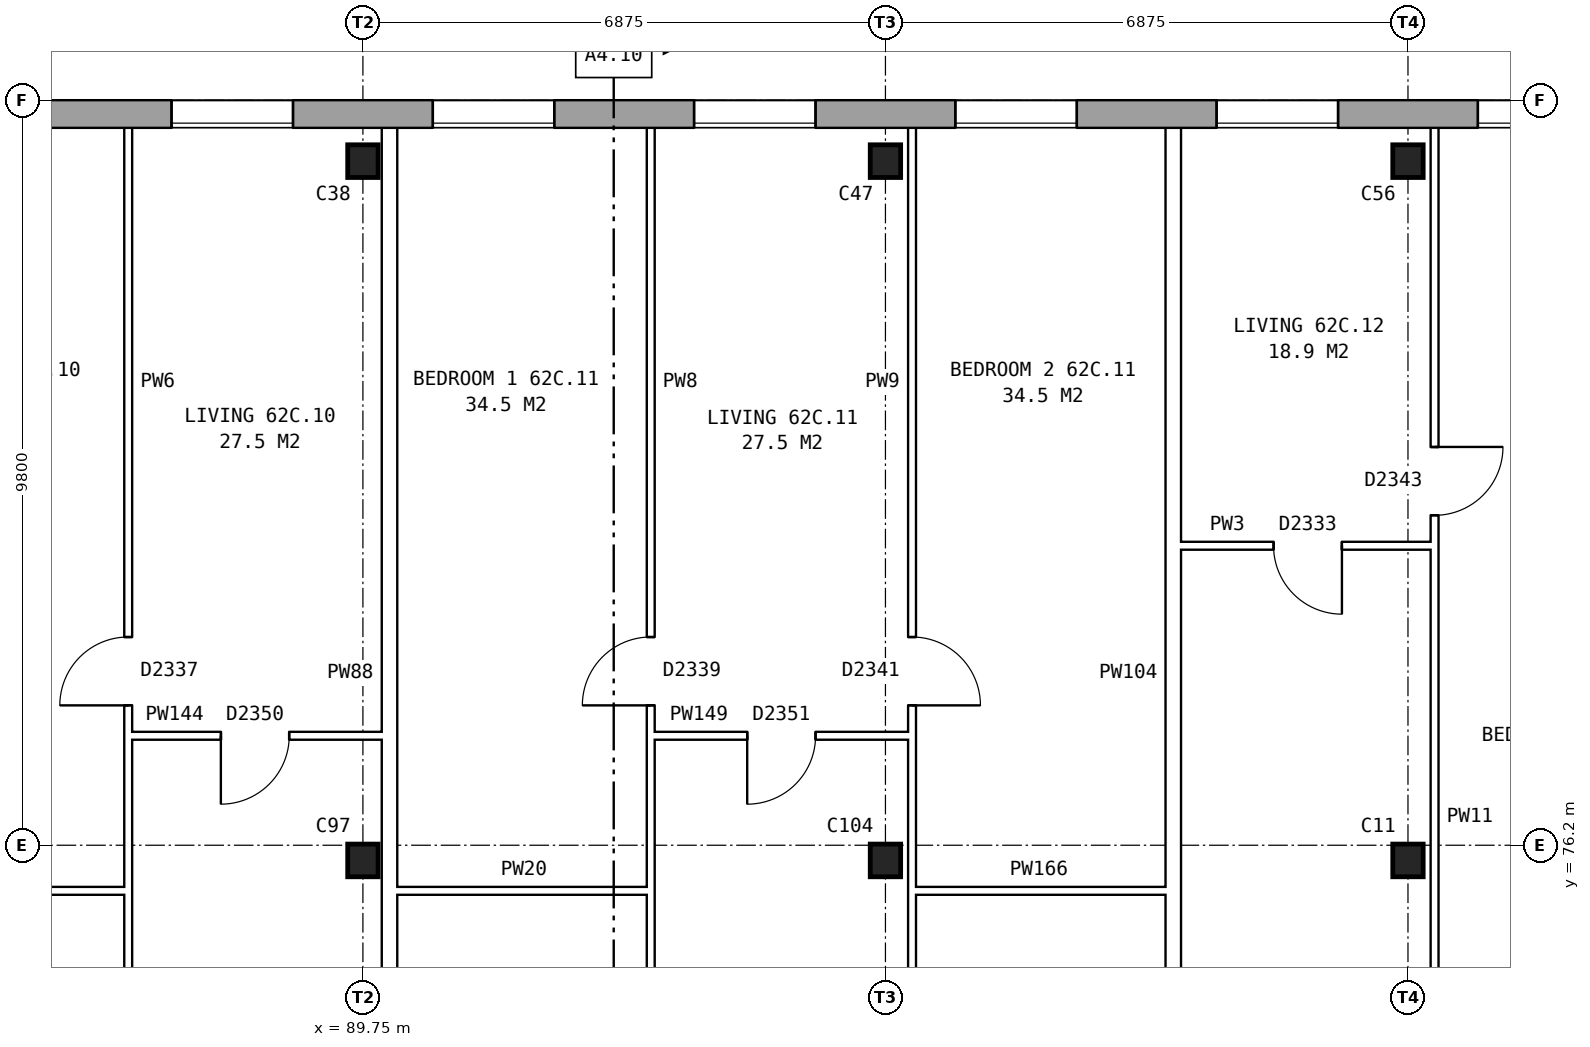
"""IFC4 building model, lengths in metres.
Left out: names, types, materials, properties, quantities, classifications, styles, units other than length and angle.
Written with IfcOpenShell. Run it as: python <this file> out.ifc"""

import sys

from ifc_helpers import new_model, si_unit, direction, frame, frame_2d, origin, origin_2d, place, context, subcontext, project, spatial, rectangle, i_section, extrude, element, fill, save


model = new_model("IFC4")
c1 = context("Model", 3, precision=1e-05, world=origin(), true_north=direction((0.0, 1.0)))
c2 = subcontext(c1, "Body", "Model", "MODEL_VIEW")
j1 = project(units=[si_unit("LENGTHUNIT", "METRE"), si_unit("PLANEANGLEUNIT", "RADIAN")], contexts=[c1])
p1 = place(None, origin())
s1 = spatial("IfcSite", under=j1, at=p1, CompositionType="ELEMENT")
p2 = place(p1, origin())
s2 = spatial("IfcBuilding", under=s1, at=p2, CompositionType="ELEMENT")
p3 = place(p2, frame((0.0, 0.0, 221.4)))
s3 = spatial("IfcBuildingStorey", under=s2, at=p3, CompositionType="ELEMENT", Elevation=221.4)
for number, where, z_axis, x_axis in (
    (1, (89.75, 76.0, 0.0), (0.0, 0.0, 1.0), (1.0, 0.0, 0.0)),
    (2, (96.625, 76.0, 0.0), (0.0, 0.0, 1.0), (1.0, 0.0, 0.0)),
    (3, (103.5, 76.0, 0.0), (0.0, 0.0, 1.0), (1.0, 0.0, 0.0)),
    (4, (89.75, 85.2, 0.0), (0.0, 0.0, 1.0), (1.0, 0.0, 0.0)),
    (5, (96.625, 85.2, 0.0), (0.0, 0.0, 1.0), (1.0, 0.0, 0.0)),
    (6, (103.5, 85.2, 0.0), (0.0, 0.0, 1.0), (1.0, 0.0, 0.0)),
):
    element("IfcColumn", number, at=place(p3, frame(where, z_axis=z_axis, x_axis=x_axis)), inside=s3, PredefinedType="COLUMN", context=c2, shape_type="SweptSolid", body=[
        extrude(i_section(OverallWidth=0.4, OverallDepth=0.43, WebThickness=0.04, FlangeThickness=0.04, at=origin_2d()), origin(), (0.0, 0.0, 1.0), 2.85),
    ])
p4 = place(p3, frame((131.05, 85.82, 0.0), z_axis=(0.0, 0.0, 1.0), x_axis=(-1.0, 0.0, 0.0)))
e7 = element("IfcWall", 7, at=p4, inside=s3, PredefinedType="STANDARD", context=c2, shape_type="SweptSolid", body=[
    extrude(rectangle(XDim=55.1, YDim=0.36, at=frame_2d((27.55, 0.0))), origin(), (0.0, 0.0, 1.0), 2.85),
])
p5 = place(p4, frame((0.969, 0.0, 0.8)))
e8 = element("IfcOpeningElement", 8, at=p5, cuts=e7, PredefinedType="OPENING", context=c2, shape_type="SweptSolid", body=[
    extrude(rectangle(XDim=1.6, YDim=1.8, at=frame_2d((0.8, 0.9))), frame((0.0, 0.19, 0.0), z_axis=(0.0, -1.0, 0.0), x_axis=(1.0, 0.0, 0.0)), (0.0, 0.0, 1.0), 0.38),
])
p6 = place(p4, frame((4.406, 0.0, 0.8)))
e9 = element("IfcOpeningElement", 9, at=p6, cuts=e7, PredefinedType="OPENING", context=c2, shape_type="SweptSolid", body=[
    extrude(rectangle(XDim=1.6, YDim=1.8, at=frame_2d((0.8, 0.9))), frame((0.0, 0.19, 0.0), z_axis=(0.0, -1.0, 0.0), x_axis=(1.0, 0.0, 0.0)), (0.0, 0.0, 1.0), 0.38),
])
p7 = place(p4, frame((7.844, 0.0, 0.8)))
e10 = element("IfcOpeningElement", 10, at=p7, cuts=e7, PredefinedType="OPENING", context=c2, shape_type="SweptSolid", body=[
    extrude(rectangle(XDim=1.6, YDim=1.8, at=frame_2d((0.8, 0.9))), frame((0.0, 0.19, 0.0), z_axis=(0.0, -1.0, 0.0), x_axis=(1.0, 0.0, 0.0)), (0.0, 0.0, 1.0), 0.38),
])
p8 = place(p4, frame((11.281, 0.0, 0.8)))
e11 = element("IfcOpeningElement", 11, at=p8, cuts=e7, PredefinedType="OPENING", context=c2, shape_type="SweptSolid", body=[
    extrude(rectangle(XDim=1.6, YDim=1.8, at=frame_2d((0.8, 0.9))), frame((0.0, 0.19, 0.0), z_axis=(0.0, -1.0, 0.0), x_axis=(1.0, 0.0, 0.0)), (0.0, 0.0, 1.0), 0.38),
])
p9 = place(p4, frame((14.719, 0.0, 0.8)))
e12 = element("IfcOpeningElement", 12, at=p9, cuts=e7, PredefinedType="OPENING", context=c2, shape_type="SweptSolid", body=[
    extrude(rectangle(XDim=1.6, YDim=1.8, at=frame_2d((0.8, 0.9))), frame((0.0, 0.19, 0.0), z_axis=(0.0, -1.0, 0.0), x_axis=(1.0, 0.0, 0.0)), (0.0, 0.0, 1.0), 0.38),
])
p10 = place(p4, frame((18.156, 0.0, 0.8)))
e13 = element("IfcOpeningElement", 13, at=p10, cuts=e7, PredefinedType="OPENING", context=c2, shape_type="SweptSolid", body=[
    extrude(rectangle(XDim=1.6, YDim=1.8, at=frame_2d((0.8, 0.9))), frame((0.0, 0.19, 0.0), z_axis=(0.0, -1.0, 0.0), x_axis=(1.0, 0.0, 0.0)), (0.0, 0.0, 1.0), 0.38),
])
p11 = place(p4, frame((21.594, 0.0, 0.8)))
e14 = element("IfcOpeningElement", 14, at=p11, cuts=e7, PredefinedType="OPENING", context=c2, shape_type="SweptSolid", body=[
    extrude(rectangle(XDim=1.6, YDim=1.8, at=frame_2d((0.8, 0.9))), frame((0.0, 0.19, 0.0), z_axis=(0.0, -1.0, 0.0), x_axis=(1.0, 0.0, 0.0)), (0.0, 0.0, 1.0), 0.38),
])
p12 = place(p4, frame((25.031, 0.0, 0.8)))
e15 = element("IfcOpeningElement", 15, at=p12, cuts=e7, PredefinedType="OPENING", context=c2, shape_type="SweptSolid", body=[
    extrude(rectangle(XDim=1.6, YDim=1.8, at=frame_2d((0.8, 0.9))), frame((0.0, 0.19, 0.0), z_axis=(0.0, -1.0, 0.0), x_axis=(1.0, 0.0, 0.0)), (0.0, 0.0, 1.0), 0.38),
])
p13 = place(p4, frame((28.469, 0.0, 0.8)))
e16 = element("IfcOpeningElement", 16, at=p13, cuts=e7, PredefinedType="OPENING", context=c2, shape_type="SweptSolid", body=[
    extrude(rectangle(XDim=1.6, YDim=1.8, at=frame_2d((0.8, 0.9))), frame((0.0, 0.19, 0.0), z_axis=(0.0, -1.0, 0.0), x_axis=(1.0, 0.0, 0.0)), (0.0, 0.0, 1.0), 0.38),
])
p14 = place(p4, frame((31.906, 0.0, 0.8)))
e17 = element("IfcOpeningElement", 17, at=p14, cuts=e7, PredefinedType="OPENING", context=c2, shape_type="SweptSolid", body=[
    extrude(rectangle(XDim=1.6, YDim=1.8, at=frame_2d((0.8, 0.9))), frame((0.0, 0.19, 0.0), z_axis=(0.0, -1.0, 0.0), x_axis=(1.0, 0.0, 0.0)), (0.0, 0.0, 1.0), 0.38),
])
p15 = place(p4, frame((35.344, 0.0, 0.8)))
e18 = element("IfcOpeningElement", 18, at=p15, cuts=e7, PredefinedType="OPENING", context=c2, shape_type="SweptSolid", body=[
    extrude(rectangle(XDim=1.6, YDim=1.8, at=frame_2d((0.8, 0.9))), frame((0.0, 0.19, 0.0), z_axis=(0.0, -1.0, 0.0), x_axis=(1.0, 0.0, 0.0)), (0.0, 0.0, 1.0), 0.38),
])
p16 = place(p4, frame((38.781, 0.0, 0.8)))
e19 = element("IfcOpeningElement", 19, at=p16, cuts=e7, PredefinedType="OPENING", context=c2, shape_type="SweptSolid", body=[
    extrude(rectangle(XDim=1.6, YDim=1.8, at=frame_2d((0.8, 0.9))), frame((0.0, 0.19, 0.0), z_axis=(0.0, -1.0, 0.0), x_axis=(1.0, 0.0, 0.0)), (0.0, 0.0, 1.0), 0.38),
])
p17 = place(p4, frame((42.219, 0.0, 0.8)))
e20 = element("IfcOpeningElement", 20, at=p17, cuts=e7, PredefinedType="OPENING", context=c2, shape_type="SweptSolid", body=[
    extrude(rectangle(XDim=1.6, YDim=1.8, at=frame_2d((0.8, 0.9))), frame((0.0, 0.19, 0.0), z_axis=(0.0, -1.0, 0.0), x_axis=(1.0, 0.0, 0.0)), (0.0, 0.0, 1.0), 0.38),
])
p18 = place(p4, frame((45.656, 0.0, 0.8)))
e21 = element("IfcOpeningElement", 21, at=p18, cuts=e7, PredefinedType="OPENING", context=c2, shape_type="SweptSolid", body=[
    extrude(rectangle(XDim=1.6, YDim=1.8, at=frame_2d((0.8, 0.9))), frame((0.0, 0.19, 0.0), z_axis=(0.0, -1.0, 0.0), x_axis=(1.0, 0.0, 0.0)), (0.0, 0.0, 1.0), 0.38),
])
p19 = place(p4, frame((49.094, 0.0, 0.8)))
e22 = element("IfcOpeningElement", 22, at=p19, cuts=e7, PredefinedType="OPENING", context=c2, shape_type="SweptSolid", body=[
    extrude(rectangle(XDim=1.6, YDim=1.8, at=frame_2d((0.8, 0.9))), frame((0.0, 0.19, 0.0), z_axis=(0.0, -1.0, 0.0), x_axis=(1.0, 0.0, 0.0)), (0.0, 0.0, 1.0), 0.38),
])
p20 = place(p4, frame((52.531, 0.0, 0.8)))
e23 = element("IfcOpeningElement", 23, at=p20, cuts=e7, PredefinedType="OPENING", context=c2, shape_type="SweptSolid", body=[
    extrude(rectangle(XDim=1.6, YDim=1.8, at=frame_2d((0.8, 0.9))), frame((0.0, 0.19, 0.0), z_axis=(0.0, -1.0, 0.0), x_axis=(1.0, 0.0, 0.0)), (0.0, 0.0, 1.0), 0.38),
])
for number, where, z_axis, x_axis in (
    (24, (83.325, 75.6, 0.0), (0.0, 0.0, 1.0), (1.0, 0.0, 0.0)),
    (25, (90.2, 75.6, 0.0), (0.0, 0.0, 1.0), (1.0, 0.0, 0.0)),
):
    element("IfcWall", number, at=place(p3, frame(where, z_axis=z_axis, x_axis=x_axis)), inside=s3, PredefinedType="PARTITIONING", context=c2, shape_type="SweptSolid", body=[
        extrude(rectangle(XDim=3.337, YDim=0.1, at=frame_2d((1.668, 0.0))), origin(), (0.0, 0.0, 1.0), 2.85),
    ])
p21 = place(p3, frame((96.975, 75.6, 0.0), z_axis=(0.0, 0.0, 1.0), x_axis=(1.0, 0.0, 0.0)))
e26 = element("IfcWall", 26, at=p21, inside=s3, PredefinedType="PARTITIONING", context=c2, shape_type="SweptSolid", body=[
    extrude(rectangle(XDim=3.337, YDim=0.1, at=frame_2d((1.668, 0.0))), origin(), (0.0, 0.0, 1.0), 2.85),
])
p22 = place(p3, frame((86.662, 77.64, 0.0), z_axis=(0.0, 0.0, 1.0), x_axis=(1.0, 0.0, 0.0)))
e27 = element("IfcWall", 27, at=p22, inside=s3, PredefinedType="PARTITIONING", context=c2, shape_type="SweptSolid", body=[
    extrude(rectangle(XDim=3.338, YDim=0.1, at=frame_2d((1.669, 0.0))), origin(), (0.0, 0.0, 1.0), 2.85),
])
p23 = place(p22, frame((1.219, 0.0, 0.0)))
e28 = element("IfcOpeningElement", 28, at=p23, cuts=e27, PredefinedType="OPENING", context=c2, shape_type="SweptSolid", body=[
    extrude(rectangle(XDim=0.9, YDim=2.1, at=frame_2d((0.45, 1.05))), frame((0.0, 0.06, 0.0), z_axis=(0.0, -1.0, 0.0), x_axis=(1.0, 0.0, 0.0)), (0.0, 0.0, 1.0), 0.12),
])
p24 = place(p3, frame((93.537, 77.64, 0.0), z_axis=(0.0, 0.0, 1.0), x_axis=(1.0, 0.0, 0.0)))
e29 = element("IfcWall", 29, at=p24, inside=s3, PredefinedType="PARTITIONING", context=c2, shape_type="SweptSolid", body=[
    extrude(rectangle(XDim=3.438, YDim=0.1, at=frame_2d((1.719, 0.0))), origin(), (0.0, 0.0, 1.0), 2.85),
])
p25 = place(p24, frame((1.269, 0.0, 0.0)))
e30 = element("IfcOpeningElement", 30, at=p25, cuts=e29, PredefinedType="OPENING", context=c2, shape_type="SweptSolid", body=[
    extrude(rectangle(XDim=0.9, YDim=2.1, at=frame_2d((0.45, 1.05))), frame((0.0, 0.06, 0.0), z_axis=(0.0, -1.0, 0.0), x_axis=(1.0, 0.0, 0.0)), (0.0, 0.0, 1.0), 0.12),
])
p26 = place(p3, frame((100.512, 80.14, 0.0), z_axis=(0.0, 0.0, 1.0), x_axis=(1.0, 0.0, 0.0)))
e31 = element("IfcWall", 31, at=p26, inside=s3, PredefinedType="PARTITIONING", context=c2, shape_type="SweptSolid", body=[
    extrude(rectangle(XDim=3.338, YDim=0.1, at=frame_2d((1.669, 0.0))), origin(), (0.0, 0.0, 1.0), 2.85),
])
p27 = place(p26, frame((1.219, 0.0, 0.0)))
e32 = element("IfcOpeningElement", 32, at=p27, cuts=e31, PredefinedType="OPENING", context=c2, shape_type="SweptSolid", body=[
    extrude(rectangle(XDim=0.9, YDim=2.1, at=frame_2d((0.45, 1.05))), frame((0.0, 0.06, 0.0), z_axis=(0.0, -1.0, 0.0), x_axis=(1.0, 0.0, 0.0)), (0.0, 0.0, 1.0), 0.12),
])
p28 = place(p3, frame((86.662, 71.3, 0.0), z_axis=(0.0, 0.0, 1.0), x_axis=(0.0, 1.0, 0.0)))
e33 = element("IfcWall", 33, at=p28, inside=s3, PredefinedType="PARTITIONING", context=c2, shape_type="SweptSolid", body=[
    extrude(rectangle(XDim=14.34, YDim=0.1, at=frame_2d((7.17, 0.0))), origin(), (0.0, 0.0, 1.0), 2.85),
])
p29 = place(p28, frame((6.74, 0.0, 0.0)))
e34 = element("IfcOpeningElement", 34, at=p29, cuts=e33, PredefinedType="OPENING", context=c2, shape_type="SweptSolid", body=[
    extrude(rectangle(XDim=0.9, YDim=2.1, at=frame_2d((0.45, 1.05))), frame((0.0, 0.06, 0.0), z_axis=(0.0, -1.0, 0.0), x_axis=(1.0, 0.0, 0.0)), (0.0, 0.0, 1.0), 0.12),
])
p30 = place(p28, frame((0.4, 0.0, 0.0)))
e35 = element("IfcOpeningElement", 35, at=p30, cuts=e33, PredefinedType="OPENING", context=c2, shape_type="SweptSolid", body=[
    extrude(rectangle(XDim=0.9, YDim=2.1, at=frame_2d((0.45, 1.05))), frame((0.0, 0.06, 0.0), z_axis=(0.0, -1.0, 0.0), x_axis=(1.0, 0.0, 0.0)), (0.0, 0.0, 1.0), 0.12),
])
p31 = place(p3, frame((90.1, 71.3, 0.0), z_axis=(0.0, 0.0, 1.0), x_axis=(0.0, 1.0, 0.0)))
e36 = element("IfcWall", 36, at=p31, inside=s3, PredefinedType="PARTITIONING", context=c2, shape_type="SweptSolid", body=[
    extrude(rectangle(XDim=14.34, YDim=0.2, at=frame_2d((7.17, 0.0))), origin(), (0.0, 0.0, 1.0), 2.85),
])
p32 = place(p3, frame((93.537, 71.3, 0.0), z_axis=(0.0, 0.0, 1.0), x_axis=(0.0, 1.0, 0.0)))
e37 = element("IfcWall", 37, at=p32, inside=s3, PredefinedType="PARTITIONING", context=c2, shape_type="SweptSolid", body=[
    extrude(rectangle(XDim=14.34, YDim=0.1, at=frame_2d((7.17, 0.0))), origin(), (0.0, 0.0, 1.0), 2.85),
])
p33 = place(p32, frame((6.74, 0.0, 0.0)))
e38 = element("IfcOpeningElement", 38, at=p33, cuts=e37, PredefinedType="OPENING", context=c2, shape_type="SweptSolid", body=[
    extrude(rectangle(XDim=0.9, YDim=2.1, at=frame_2d((0.45, 1.05))), frame((0.0, 0.06, 0.0), z_axis=(0.0, -1.0, 0.0), x_axis=(1.0, 0.0, 0.0)), (0.0, 0.0, 1.0), 0.12),
])
p34 = place(p32, frame((0.4, 0.0, 0.0)))
e39 = element("IfcOpeningElement", 39, at=p34, cuts=e37, PredefinedType="OPENING", context=c2, shape_type="SweptSolid", body=[
    extrude(rectangle(XDim=0.9, YDim=2.1, at=frame_2d((0.45, 1.05))), frame((0.0, 0.06, 0.0), z_axis=(0.0, -1.0, 0.0), x_axis=(1.0, 0.0, 0.0)), (0.0, 0.0, 1.0), 0.12),
])
p35 = place(p3, frame((96.975, 71.3, 0.0), z_axis=(0.0, 0.0, 1.0), x_axis=(0.0, 1.0, 0.0)))
e40 = element("IfcWall", 40, at=p35, inside=s3, PredefinedType="PARTITIONING", context=c2, shape_type="SweptSolid", body=[
    extrude(rectangle(XDim=14.34, YDim=0.1, at=frame_2d((7.17, 0.0))), origin(), (0.0, 0.0, 1.0), 2.85),
])
p36 = place(p35, frame((6.74, 0.0, 0.0)))
e41 = element("IfcOpeningElement", 41, at=p36, cuts=e40, PredefinedType="OPENING", context=c2, shape_type="SweptSolid", body=[
    extrude(rectangle(XDim=0.9, YDim=2.1, at=frame_2d((0.45, 1.05))), frame((0.0, 0.06, 0.0), z_axis=(0.0, -1.0, 0.0), x_axis=(1.0, 0.0, 0.0)), (0.0, 0.0, 1.0), 0.12),
])
p37 = place(p35, frame((0.4, 0.0, 0.0)))
e42 = element("IfcOpeningElement", 42, at=p37, cuts=e40, PredefinedType="OPENING", context=c2, shape_type="SweptSolid", body=[
    extrude(rectangle(XDim=0.9, YDim=2.1, at=frame_2d((0.45, 1.05))), frame((0.0, 0.06, 0.0), z_axis=(0.0, -1.0, 0.0), x_axis=(1.0, 0.0, 0.0)), (0.0, 0.0, 1.0), 0.12),
])
p38 = place(p3, frame((100.412, 71.3, 0.0), z_axis=(0.0, 0.0, 1.0), x_axis=(0.0, 1.0, 0.0)))
e43 = element("IfcWall", 43, at=p38, inside=s3, PredefinedType="PARTITIONING", context=c2, shape_type="SweptSolid", body=[
    extrude(rectangle(XDim=14.34, YDim=0.2, at=frame_2d((7.17, 0.0))), origin(), (0.0, 0.0, 1.0), 2.85),
])
p39 = place(p3, frame((103.85, 71.3, 0.0), z_axis=(0.0, 0.0, 1.0), x_axis=(0.0, 1.0, 0.0)))
e44 = element("IfcWall", 44, at=p39, inside=s3, PredefinedType="PARTITIONING", context=c2, shape_type="SweptSolid", body=[
    extrude(rectangle(XDim=14.34, YDim=0.1, at=frame_2d((7.17, 0.0))), origin(), (0.0, 0.0, 1.0), 2.85),
])
p40 = place(p39, frame((9.24, 0.0, 0.0)))
e45 = element("IfcOpeningElement", 45, at=p40, cuts=e44, PredefinedType="OPENING", context=c2, shape_type="SweptSolid", body=[
    extrude(rectangle(XDim=0.9, YDim=2.1, at=frame_2d((0.45, 1.05))), frame((0.0, 0.06, 0.0), z_axis=(0.0, -1.0, 0.0), x_axis=(1.0, 0.0, 0.0)), (0.0, 0.0, 1.0), 0.12),
])
p41 = place(p39, frame((0.4, 0.0, 0.0)))
e46 = element("IfcOpeningElement", 46, at=p41, cuts=e44, PredefinedType="OPENING", context=c2, shape_type="SweptSolid", body=[
    extrude(rectangle(XDim=0.9, YDim=2.1, at=frame_2d((0.45, 1.05))), frame((0.0, 0.06, 0.0), z_axis=(0.0, -1.0, 0.0), x_axis=(1.0, 0.0, 0.0)), (0.0, 0.0, 1.0), 0.12),
])
p42 = place(p12, origin())
e47 = element("IfcWindow", 47, at=p42, inside=s3, PartitioningType="SINGLE_PANEL", PredefinedType="WINDOW", context=c2, shape_type="SweptSolid", body=[
    extrude(rectangle(XDim=1.6, YDim=1.8, at=frame_2d((0.8, 0.9))), frame((0.0, 0.15, 0.0), z_axis=(0.0, -1.0, 0.0), x_axis=(1.0, 0.0, 0.0)), (0.0, 0.0, 1.0), 0.06),
])
fill(e15, e47)
p43 = place(p13, origin())
e48 = element("IfcWindow", 48, at=p43, inside=s3, PartitioningType="SINGLE_PANEL", PredefinedType="WINDOW", context=c2, shape_type="SweptSolid", body=[
    extrude(rectangle(XDim=1.6, YDim=1.8, at=frame_2d((0.8, 0.9))), frame((0.0, 0.15, 0.0), z_axis=(0.0, -1.0, 0.0), x_axis=(1.0, 0.0, 0.0)), (0.0, 0.0, 1.0), 0.06),
])
fill(e16, e48)
p44 = place(p14, origin())
e49 = element("IfcWindow", 49, at=p44, inside=s3, PartitioningType="SINGLE_PANEL", PredefinedType="WINDOW", context=c2, shape_type="SweptSolid", body=[
    extrude(rectangle(XDim=1.6, YDim=1.8, at=frame_2d((0.8, 0.9))), frame((0.0, 0.15, 0.0), z_axis=(0.0, -1.0, 0.0), x_axis=(1.0, 0.0, 0.0)), (0.0, 0.0, 1.0), 0.06),
])
fill(e17, e49)
p45 = place(p15, origin())
e50 = element("IfcWindow", 50, at=p45, inside=s3, PartitioningType="SINGLE_PANEL", PredefinedType="WINDOW", context=c2, shape_type="SweptSolid", body=[
    extrude(rectangle(XDim=1.6, YDim=1.8, at=frame_2d((0.8, 0.9))), frame((0.0, 0.15, 0.0), z_axis=(0.0, -1.0, 0.0), x_axis=(1.0, 0.0, 0.0)), (0.0, 0.0, 1.0), 0.06),
])
fill(e18, e50)
p46 = place(p16, origin())
e51 = element("IfcWindow", 51, at=p46, inside=s3, PartitioningType="SINGLE_PANEL", PredefinedType="WINDOW", context=c2, shape_type="SweptSolid", body=[
    extrude(rectangle(XDim=1.6, YDim=1.8, at=frame_2d((0.8, 0.9))), frame((0.0, 0.15, 0.0), z_axis=(0.0, -1.0, 0.0), x_axis=(1.0, 0.0, 0.0)), (0.0, 0.0, 1.0), 0.06),
])
fill(e19, e51)
p47 = place(p17, origin())
e52 = element("IfcWindow", 52, at=p47, inside=s3, PartitioningType="SINGLE_PANEL", PredefinedType="WINDOW", context=c2, shape_type="SweptSolid", body=[
    extrude(rectangle(XDim=1.6, YDim=1.8, at=frame_2d((0.8, 0.9))), frame((0.0, 0.15, 0.0), z_axis=(0.0, -1.0, 0.0), x_axis=(1.0, 0.0, 0.0)), (0.0, 0.0, 1.0), 0.06),
])
fill(e20, e52)
p48 = place(p29, origin())
e53 = element("IfcDoor", 53, at=p48, inside=s3, OperationType="SINGLE_SWING_LEFT", PredefinedType="DOOR", context=c2, shape_type="SweptSolid", body=[
    extrude(rectangle(XDim=0.9, YDim=2.1, at=frame_2d((0.45, 1.05))), frame((0.0, 0.025, 0.0), z_axis=(0.0, -1.0, 0.0), x_axis=(1.0, 0.0, 0.0)), (0.0, 0.0, 1.0), 0.05),
])
fill(e34, e53)
p49 = place(p23, frame((0.9, 0.0, 0.0), z_axis=(0.0, 0.0, 1.0), x_axis=(-1.0, 0.0, 0.0)))
e54 = element("IfcDoor", 54, at=p49, inside=s3, OperationType="SINGLE_SWING_RIGHT", PredefinedType="DOOR", context=c2, shape_type="SweptSolid", body=[
    extrude(rectangle(XDim=0.9, YDim=2.1, at=frame_2d((0.45, 1.05))), frame((0.0, 0.025, 0.0), z_axis=(0.0, -1.0, 0.0), x_axis=(1.0, 0.0, 0.0)), (0.0, 0.0, 1.0), 0.05),
])
fill(e28, e54)
p50 = place(p33, origin())
e55 = element("IfcDoor", 55, at=p50, inside=s3, OperationType="SINGLE_SWING_LEFT", PredefinedType="DOOR", context=c2, shape_type="SweptSolid", body=[
    extrude(rectangle(XDim=0.9, YDim=2.1, at=frame_2d((0.45, 1.05))), frame((0.0, 0.025, 0.0), z_axis=(0.0, -1.0, 0.0), x_axis=(1.0, 0.0, 0.0)), (0.0, 0.0, 1.0), 0.05),
])
fill(e38, e55)
p51 = place(p36, frame((0.9, 0.0, 0.0), z_axis=(0.0, 0.0, 1.0), x_axis=(-1.0, 0.0, 0.0)))
e56 = element("IfcDoor", 56, at=p51, inside=s3, OperationType="SINGLE_SWING_RIGHT", PredefinedType="DOOR", context=c2, shape_type="SweptSolid", body=[
    extrude(rectangle(XDim=0.9, YDim=2.1, at=frame_2d((0.45, 1.05))), frame((0.0, 0.025, 0.0), z_axis=(0.0, -1.0, 0.0), x_axis=(1.0, 0.0, 0.0)), (0.0, 0.0, 1.0), 0.05),
])
fill(e41, e56)
p52 = place(p25, frame((0.9, 0.0, 0.0), z_axis=(0.0, 0.0, 1.0), x_axis=(-1.0, 0.0, 0.0)))
e57 = element("IfcDoor", 57, at=p52, inside=s3, OperationType="SINGLE_SWING_RIGHT", PredefinedType="DOOR", context=c2, shape_type="SweptSolid", body=[
    extrude(rectangle(XDim=0.9, YDim=2.1, at=frame_2d((0.45, 1.05))), frame((0.0, 0.025, 0.0), z_axis=(0.0, -1.0, 0.0), x_axis=(1.0, 0.0, 0.0)), (0.0, 0.0, 1.0), 0.05),
])
fill(e30, e57)
p53 = place(p40, frame((0.9, 0.0, 0.0), z_axis=(0.0, 0.0, 1.0), x_axis=(-1.0, 0.0, 0.0)))
e58 = element("IfcDoor", 58, at=p53, inside=s3, OperationType="SINGLE_SWING_LEFT", PredefinedType="DOOR", context=c2, shape_type="SweptSolid", body=[
    extrude(rectangle(XDim=0.9, YDim=2.1, at=frame_2d((0.45, 1.05))), frame((0.0, 0.025, 0.0), z_axis=(0.0, -1.0, 0.0), x_axis=(1.0, 0.0, 0.0)), (0.0, 0.0, 1.0), 0.05),
])
fill(e45, e58)
p54 = place(p27, frame((0.9, 0.0, 0.0), z_axis=(0.0, 0.0, 1.0), x_axis=(-1.0, 0.0, 0.0)))
e59 = element("IfcDoor", 59, at=p54, inside=s3, OperationType="SINGLE_SWING_LEFT", PredefinedType="DOOR", context=c2, shape_type="SweptSolid", body=[
    extrude(rectangle(XDim=0.9, YDim=2.1, at=frame_2d((0.45, 1.05))), frame((0.0, 0.025, 0.0), z_axis=(0.0, -1.0, 0.0), x_axis=(1.0, 0.0, 0.0)), (0.0, 0.0, 1.0), 0.05),
])
fill(e32, e59)
save(model, sys.argv[1])
